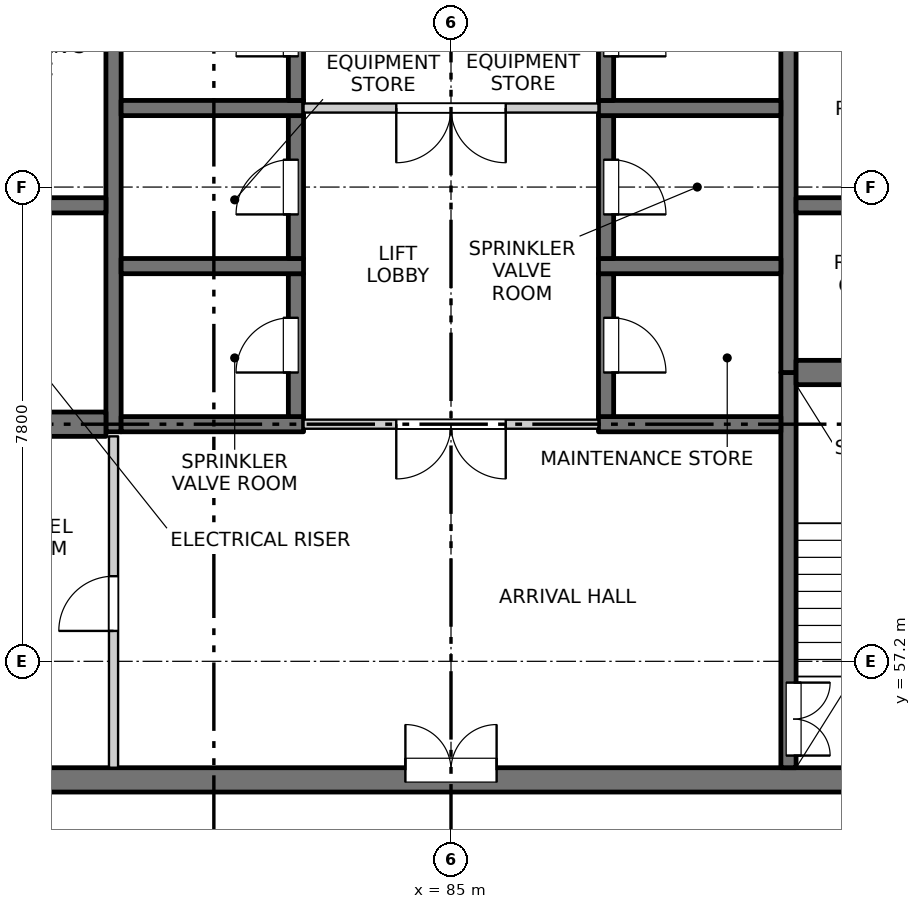
"""IFC4 building model, lengths in metres.
Left out: names, types, materials, properties, quantities, classifications, styles, units other than length and angle.
Written with IfcOpenShell. Run it as: python <this file> out.ifc"""

import sys

from ifc_helpers import new_model, si_unit, direction, frame, frame_2d, origin, place, context, subcontext, project, spatial, rectangle, extrude, element, fill, save


model = new_model("IFC4")
c1 = context("Model", 3, precision=1e-05, world=origin(), true_north=direction((0.0, 1.0)))
c2 = subcontext(c1, "Body", "Model", "MODEL_VIEW")
j1 = project(units=[si_unit("LENGTHUNIT", "METRE"), si_unit("PLANEANGLEUNIT", "RADIAN")], contexts=[c1])
p1 = place(None, origin())
s1 = spatial("IfcSite", under=j1, at=p1, CompositionType="ELEMENT")
p2 = place(p1, origin())
s2 = spatial("IfcBuilding", under=s1, at=p2, CompositionType="ELEMENT")
p3 = place(p2, frame((0.0, 0.0, 200.7)))
s3 = spatial("IfcBuildingStorey", under=s2, at=p3, CompositionType="ELEMENT", Elevation=200.7)
p4 = place(p3, frame((75.45, 55.25, -0.25), z_axis=(0.0, 0.0, 1.0), x_axis=(1.0, 0.0, 0.0)))
e1 = element("IfcWall", 1, at=p4, inside=s3, PredefinedType="SOLIDWALL", context=c2, shape_type="SweptSolid", body=[
    extrude(rectangle(XDim=19.1, YDim=0.4, at=frame_2d((9.55, 0.0))), origin(), (0.0, 0.0, 1.0), 3.4),
])
p5 = place(p4, frame((8.8, 0.0, 0.25)))
e2 = element("IfcOpeningElement", 2, at=p5, cuts=e1, PredefinedType="OPENING", context=c2, shape_type="SweptSolid", body=[
    extrude(rectangle(XDim=1.5, YDim=2.1, at=frame_2d((0.75, 1.05))), frame((0.0, 0.21, 0.0), z_axis=(0.0, -1.0, 0.0), x_axis=(1.0, 0.0, 0.0)), (0.0, 0.0, 1.0), 0.42),
])
p6 = place(p3, frame((79.45, 60.975, -0.25), z_axis=(0.0, 0.0, 1.0), x_axis=(0.0, 1.0, 0.0)))
e3 = element("IfcWall", 3, at=p6, inside=s3, PredefinedType="SOLIDWALL", context=c2, shape_type="SweptSolid", body=[
    extrude(rectangle(XDim=16.325, YDim=0.25, at=frame_2d((8.163, 0.0))), origin(), (0.0, 0.0, 1.0), 3.4),
])
p7 = place(p3, frame((90.55, 55.45, -0.25), z_axis=(0.0, 0.0, 1.0), x_axis=(0.0, 1.0, 0.0)))
e4 = element("IfcWall", 4, at=p7, inside=s3, PredefinedType="SOLIDWALL", context=c2, shape_type="SweptSolid", body=[
    extrude(rectangle(XDim=6.5, YDim=0.25, at=frame_2d((3.25, 0.0))), origin(), (0.0, 0.0, 1.0), 3.4),
])
p8 = place(p7, frame((0.2, 0.0, 0.25)))
e5 = element("IfcOpeningElement", 5, at=p8, cuts=e4, PredefinedType="OPENING", context=c2, shape_type="SweptSolid", body=[
    extrude(rectangle(XDim=1.2, YDim=2.1, at=frame_2d((0.6, 1.05))), frame((0.0, 0.135, 0.0), z_axis=(0.0, -1.0, 0.0), x_axis=(1.0, 0.0, 0.0)), (0.0, 0.0, 1.0), 0.27),
])
p9 = place(p3, frame((90.55, 61.95, -0.25), z_axis=(0.0, 0.0, 1.0), x_axis=(0.0, 1.0, 0.0)))
e6 = element("IfcWall", 6, at=p9, inside=s3, PredefinedType="SOLIDWALL", context=c2, shape_type="SweptSolid", body=[
    extrude(rectangle(XDim=15.35, YDim=0.25, at=frame_2d((7.675, 0.0))), origin(), (0.0, 0.0, 1.0), 3.4),
])
p10 = place(p3, frame((79.575, 61.1, -0.25), z_axis=(0.0, 0.0, 1.0), x_axis=(1.0, 0.0, 0.0)))
e7 = element("IfcWall", 7, at=p10, inside=s3, PredefinedType="SOLIDWALL", context=c2, shape_type="SweptSolid", body=[
    extrude(rectangle(XDim=3.0, YDim=0.25, at=frame_2d((1.5, 0.0))), origin(), (0.0, 0.0, 1.0), 3.4),
])
p11 = place(p3, frame((82.45, 61.225, -0.25), z_axis=(0.0, 0.0, 1.0), x_axis=(0.0, 1.0, 0.0)))
e8 = element("IfcWall", 8, at=p11, inside=s3, PredefinedType="SOLIDWALL", context=c2, shape_type="SweptSolid", body=[
    extrude(rectangle(XDim=2.35, YDim=0.25, at=frame_2d((1.175, 0.0))), origin(), (0.0, 0.0, 1.0), 3.4),
])
p12 = place(p11, frame((0.725, 0.0, 0.25)))
e9 = element("IfcOpeningElement", 9, at=p12, cuts=e8, PredefinedType="OPENING", context=c2, shape_type="SweptSolid", body=[
    extrude(rectangle(XDim=0.9, YDim=2.1, at=frame_2d((0.45, 1.05))), frame((0.0, 0.135, 0.0), z_axis=(0.0, -1.0, 0.0), x_axis=(1.0, 0.0, 0.0)), (0.0, 0.0, 1.0), 0.27),
])
p13 = place(p3, frame((79.575, 63.7, -0.25), z_axis=(0.0, 0.0, 1.0), x_axis=(1.0, 0.0, 0.0)))
e10 = element("IfcWall", 10, at=p13, inside=s3, PredefinedType="SOLIDWALL", context=c2, shape_type="SweptSolid", body=[
    extrude(rectangle(XDim=3.0, YDim=0.25, at=frame_2d((1.5, 0.0))), origin(), (0.0, 0.0, 1.0), 3.4),
])
p14 = place(p3, frame((82.45, 63.825, -0.25), z_axis=(0.0, 0.0, 1.0), x_axis=(0.0, 1.0, 0.0)))
e11 = element("IfcWall", 11, at=p14, inside=s3, PredefinedType="SOLIDWALL", context=c2, shape_type="SweptSolid", body=[
    extrude(rectangle(XDim=2.35, YDim=0.25, at=frame_2d((1.175, 0.0))), origin(), (0.0, 0.0, 1.0), 3.4),
])
p15 = place(p14, frame((0.725, 0.0, 0.25)))
e12 = element("IfcOpeningElement", 12, at=p15, cuts=e11, PredefinedType="OPENING", context=c2, shape_type="SweptSolid", body=[
    extrude(rectangle(XDim=0.9, YDim=2.1, at=frame_2d((0.45, 1.05))), frame((0.0, 0.135, 0.0), z_axis=(0.0, -1.0, 0.0), x_axis=(1.0, 0.0, 0.0)), (0.0, 0.0, 1.0), 0.27),
])
p16 = place(p3, frame((79.575, 66.3, -0.25), z_axis=(0.0, 0.0, 1.0), x_axis=(1.0, 0.0, 0.0)))
e13 = element("IfcWall", 13, at=p16, inside=s3, PredefinedType="SOLIDWALL", context=c2, shape_type="SweptSolid", body=[
    extrude(rectangle(XDim=3.0, YDim=0.25, at=frame_2d((1.5, 0.0))), origin(), (0.0, 0.0, 1.0), 3.4),
])
p17 = place(p3, frame((82.45, 66.425, -0.25), z_axis=(0.0, 0.0, 1.0), x_axis=(0.0, 1.0, 0.0)))
e14 = element("IfcWall", 14, at=p17, inside=s3, PredefinedType="SOLIDWALL", context=c2, shape_type="SweptSolid", body=[
    extrude(rectangle(XDim=2.35, YDim=0.25, at=frame_2d((1.175, 0.0))), origin(), (0.0, 0.0, 1.0), 3.4),
])
p18 = place(p17, frame((0.725, 0.0, 0.25)))
e15 = element("IfcOpeningElement", 15, at=p18, cuts=e14, PredefinedType="OPENING", context=c2, shape_type="SweptSolid", body=[
    extrude(rectangle(XDim=0.9, YDim=2.1, at=frame_2d((0.45, 1.05))), frame((0.0, 0.135, 0.0), z_axis=(0.0, -1.0, 0.0), x_axis=(1.0, 0.0, 0.0)), (0.0, 0.0, 1.0), 0.27),
])
p19 = place(p3, frame((87.425, 61.1, -0.25), z_axis=(0.0, 0.0, 1.0), x_axis=(1.0, 0.0, 0.0)))
e16 = element("IfcWall", 16, at=p19, inside=s3, PredefinedType="SOLIDWALL", context=c2, shape_type="SweptSolid", body=[
    extrude(rectangle(XDim=3.0, YDim=0.25, at=frame_2d((1.5, 0.0))), origin(), (0.0, 0.0, 1.0), 3.4),
])
p20 = place(p3, frame((87.55, 61.225, -0.25), z_axis=(0.0, 0.0, 1.0), x_axis=(0.0, 1.0, 0.0)))
e17 = element("IfcWall", 17, at=p20, inside=s3, PredefinedType="SOLIDWALL", context=c2, shape_type="SweptSolid", body=[
    extrude(rectangle(XDim=2.35, YDim=0.25, at=frame_2d((1.175, 0.0))), origin(), (0.0, 0.0, 1.0), 3.4),
])
p21 = place(p20, frame((0.725, 0.0, 0.25)))
e18 = element("IfcOpeningElement", 18, at=p21, cuts=e17, PredefinedType="OPENING", context=c2, shape_type="SweptSolid", body=[
    extrude(rectangle(XDim=0.9, YDim=2.1, at=frame_2d((0.45, 1.05))), frame((0.0, 0.135, 0.0), z_axis=(0.0, -1.0, 0.0), x_axis=(1.0, 0.0, 0.0)), (0.0, 0.0, 1.0), 0.27),
])
p22 = place(p3, frame((87.425, 63.7, -0.25), z_axis=(0.0, 0.0, 1.0), x_axis=(1.0, 0.0, 0.0)))
e19 = element("IfcWall", 19, at=p22, inside=s3, PredefinedType="SOLIDWALL", context=c2, shape_type="SweptSolid", body=[
    extrude(rectangle(XDim=3.0, YDim=0.25, at=frame_2d((1.5, 0.0))), origin(), (0.0, 0.0, 1.0), 3.4),
])
p23 = place(p3, frame((87.55, 63.825, -0.25), z_axis=(0.0, 0.0, 1.0), x_axis=(0.0, 1.0, 0.0)))
e20 = element("IfcWall", 20, at=p23, inside=s3, PredefinedType="SOLIDWALL", context=c2, shape_type="SweptSolid", body=[
    extrude(rectangle(XDim=2.35, YDim=0.25, at=frame_2d((1.175, 0.0))), origin(), (0.0, 0.0, 1.0), 3.4),
])
p24 = place(p23, frame((0.725, 0.0, 0.25)))
e21 = element("IfcOpeningElement", 21, at=p24, cuts=e20, PredefinedType="OPENING", context=c2, shape_type="SweptSolid", body=[
    extrude(rectangle(XDim=0.9, YDim=2.1, at=frame_2d((0.45, 1.05))), frame((0.0, 0.135, 0.0), z_axis=(0.0, -1.0, 0.0), x_axis=(1.0, 0.0, 0.0)), (0.0, 0.0, 1.0), 0.27),
])
p25 = place(p3, frame((87.425, 66.3, -0.25), z_axis=(0.0, 0.0, 1.0), x_axis=(1.0, 0.0, 0.0)))
e22 = element("IfcWall", 22, at=p25, inside=s3, PredefinedType="SOLIDWALL", context=c2, shape_type="SweptSolid", body=[
    extrude(rectangle(XDim=3.0, YDim=0.25, at=frame_2d((1.5, 0.0))), origin(), (0.0, 0.0, 1.0), 3.4),
])
p26 = place(p3, frame((87.55, 66.425, -0.25), z_axis=(0.0, 0.0, 1.0), x_axis=(0.0, 1.0, 0.0)))
e23 = element("IfcWall", 23, at=p26, inside=s3, PredefinedType="SOLIDWALL", context=c2, shape_type="SweptSolid", body=[
    extrude(rectangle(XDim=2.35, YDim=0.25, at=frame_2d((1.175, 0.0))), origin(), (0.0, 0.0, 1.0), 3.4),
])
p27 = place(p26, frame((0.725, 0.0, 0.25)))
e24 = element("IfcOpeningElement", 24, at=p27, cuts=e23, PredefinedType="OPENING", context=c2, shape_type="SweptSolid", body=[
    extrude(rectangle(XDim=0.9, YDim=2.1, at=frame_2d((0.45, 1.05))), frame((0.0, 0.135, 0.0), z_axis=(0.0, -1.0, 0.0), x_axis=(1.0, 0.0, 0.0)), (0.0, 0.0, 1.0), 0.27),
])
p28 = place(p3, frame((75.45, 61.1, -0.25), z_axis=(0.0, 0.0, 1.0), x_axis=(1.0, 0.0, 0.0)))
e25 = element("IfcWall", 25, at=p28, inside=s3, PredefinedType="SOLIDWALL", context=c2, shape_type="SweptSolid", body=[
    extrude(rectangle(XDim=3.875, YDim=0.4, at=frame_2d((1.938, 0.0))), origin(), (0.0, 0.0, 1.0), 3.4),
])
p29 = place(p3, frame((75.45, 64.7, -0.25), z_axis=(0.0, 0.0, 1.0), x_axis=(1.0, 0.0, 0.0)))
e26 = element("IfcWall", 26, at=p29, inside=s3, PredefinedType="SOLIDWALL", context=c2, shape_type="SweptSolid", body=[
    extrude(rectangle(XDim=3.875, YDim=0.25, at=frame_2d((1.938, 0.0))), origin(), (0.0, 0.0, 1.0), 3.4),
])
p30 = place(p3, frame((90.675, 61.95, -0.25), z_axis=(0.0, 0.0, 1.0), x_axis=(1.0, 0.0, 0.0)))
e27 = element("IfcWall", 27, at=p30, inside=s3, PredefinedType="SOLIDWALL", context=c2, shape_type="SweptSolid", body=[
    extrude(rectangle(XDim=3.875, YDim=0.4, at=frame_2d((1.938, 0.0))), origin(), (0.0, 0.0, 1.0), 3.4),
])
p31 = place(p3, frame((90.675, 64.7, -0.25), z_axis=(0.0, 0.0, 1.0), x_axis=(1.0, 0.0, 0.0)))
e28 = element("IfcWall", 28, at=p31, inside=s3, PredefinedType="SOLIDWALL", context=c2, shape_type="SweptSolid", body=[
    extrude(rectangle(XDim=3.875, YDim=0.25, at=frame_2d((1.938, 0.0))), origin(), (0.0, 0.0, 1.0), 3.4),
])
p32 = place(p3, frame((82.575, 61.1, 0.0), z_axis=(0.0, 0.0, 1.0), x_axis=(1.0, 0.0, 0.0)))
e29 = element("IfcWall", 29, at=p32, inside=s3, PredefinedType="PARTITIONING", context=c2, shape_type="SweptSolid", body=[
    extrude(rectangle(XDim=4.85, YDim=0.15, at=frame_2d((2.425, 0.0))), origin(), (0.0, 0.0, 1.0), 3.15),
])
p33 = place(p32, frame((1.525, 0.0, 0.0)))
e30 = element("IfcOpeningElement", 30, at=p33, cuts=e29, PredefinedType="OPENING", context=c2, shape_type="SweptSolid", body=[
    extrude(rectangle(XDim=1.8, YDim=2.1, at=frame_2d((0.9, 1.05))), frame((0.0, 0.085, 0.0), z_axis=(0.0, -1.0, 0.0), x_axis=(1.0, 0.0, 0.0)), (0.0, 0.0, 1.0), 0.17),
])
p34 = place(p3, frame((82.575, 66.3, 0.0), z_axis=(0.0, 0.0, 1.0), x_axis=(1.0, 0.0, 0.0)))
e31 = element("IfcWall", 31, at=p34, inside=s3, PredefinedType="PARTITIONING", context=c2, shape_type="SweptSolid", body=[
    extrude(rectangle(XDim=4.85, YDim=0.15, at=frame_2d((2.425, 0.0))), origin(), (0.0, 0.0, 1.0), 3.15),
])
p35 = place(p34, frame((1.525, 0.0, 0.0)))
e32 = element("IfcOpeningElement", 32, at=p35, cuts=e31, PredefinedType="OPENING", context=c2, shape_type="SweptSolid", body=[
    extrude(rectangle(XDim=1.8, YDim=2.1, at=frame_2d((0.9, 1.05))), frame((0.0, 0.085, 0.0), z_axis=(0.0, -1.0, 0.0), x_axis=(1.0, 0.0, 0.0)), (0.0, 0.0, 1.0), 0.17),
])
p36 = place(p3, frame((79.45, 55.45, 0.0), z_axis=(0.0, 0.0, 1.0), x_axis=(0.0, 1.0, 0.0)))
e33 = element("IfcWall", 33, at=p36, inside=s3, PredefinedType="PARTITIONING", context=c2, shape_type="SweptSolid", body=[
    extrude(rectangle(XDim=5.45, YDim=0.15, at=frame_2d((2.725, 0.0))), origin(), (0.0, 0.0, 1.0), 3.15),
])
p37 = place(p36, frame((2.25, 0.0, 0.0)))
e34 = element("IfcOpeningElement", 34, at=p37, cuts=e33, PredefinedType="OPENING", context=c2, shape_type="SweptSolid", body=[
    extrude(rectangle(XDim=0.9, YDim=2.1, at=frame_2d((0.45, 1.05))), frame((0.0, 0.085, 0.0), z_axis=(0.0, -1.0, 0.0), x_axis=(1.0, 0.0, 0.0)), (0.0, 0.0, 1.0), 0.17),
])
p38 = place(p5, origin())
e35 = element("IfcDoor", 35, at=p38, inside=s3, OperationType="DOUBLE_DOOR_SINGLE_SWING", PredefinedType="DOOR", context=c2, shape_type="SweptSolid", body=[
    extrude(rectangle(XDim=1.5, YDim=2.1, at=frame_2d((0.75, 1.05))), frame((0.0, 0.185, 0.0), z_axis=(0.0, -1.0, 0.0), x_axis=(1.0, 0.0, 0.0)), (0.0, 0.0, 1.0), 0.05),
])
fill(e2, e35)
p39 = place(p8, origin())
e36 = element("IfcDoor", 36, at=p39, inside=s3, OperationType="DOUBLE_DOOR_SINGLE_SWING", PredefinedType="DOOR", context=c2, shape_type="SweptSolid", body=[
    extrude(rectangle(XDim=1.2, YDim=2.1, at=frame_2d((0.6, 1.05))), frame((0.0, -0.06, 0.0), z_axis=(0.0, -1.0, 0.0), x_axis=(1.0, 0.0, 0.0)), (0.0, 0.0, 1.0), 0.05),
])
fill(e5, e36)
p40 = place(p37, origin())
e37 = element("IfcDoor", 37, at=p40, inside=s3, OperationType="SINGLE_SWING_LEFT", PredefinedType="DOOR", context=c2, shape_type="SweptSolid", body=[
    extrude(rectangle(XDim=0.9, YDim=2.1, at=frame_2d((0.45, 1.05))), frame((0.0, 0.025, 0.0), z_axis=(0.0, -1.0, 0.0), x_axis=(1.0, 0.0, 0.0)), (0.0, 0.0, 1.0), 0.05),
])
fill(e34, e37)
p41 = place(p33, origin())
e38 = element("IfcDoor", 38, at=p41, inside=s3, OperationType="DOUBLE_DOOR_SINGLE_SWING", PredefinedType="DOOR", context=c2, shape_type="SweptSolid", body=[
    extrude(rectangle(XDim=1.8, YDim=2.1, at=frame_2d((0.9, 1.05))), frame((0.0, 0.025, 0.0), z_axis=(0.0, -1.0, 0.0), x_axis=(1.0, 0.0, 0.0)), (0.0, 0.0, 1.0), 0.05),
])
fill(e30, e38)
p42 = place(p12, origin())
e39 = element("IfcDoor", 39, at=p42, inside=s3, OperationType="SINGLE_SWING_LEFT", PredefinedType="DOOR", context=c2, shape_type="SweptSolid", body=[
    extrude(rectangle(XDim=0.9, YDim=2.1, at=frame_2d((0.45, 1.05))), frame((0.0, 0.11, 0.0), z_axis=(0.0, -1.0, 0.0), x_axis=(1.0, 0.0, 0.0)), (0.0, 0.0, 1.0), 0.05),
])
fill(e9, e39)
p43 = place(p21, origin())
e40 = element("IfcDoor", 40, at=p43, inside=s3, OperationType="SINGLE_SWING_RIGHT", PredefinedType="DOOR", context=c2, shape_type="SweptSolid", body=[
    extrude(rectangle(XDim=0.9, YDim=2.1, at=frame_2d((0.45, 1.05))), frame((0.0, -0.06, 0.0), z_axis=(0.0, -1.0, 0.0), x_axis=(1.0, 0.0, 0.0)), (0.0, 0.0, 1.0), 0.05),
])
fill(e18, e40)
p44 = place(p15, origin())
e41 = element("IfcDoor", 41, at=p44, inside=s3, OperationType="SINGLE_SWING_LEFT", PredefinedType="DOOR", context=c2, shape_type="SweptSolid", body=[
    extrude(rectangle(XDim=0.9, YDim=2.1, at=frame_2d((0.45, 1.05))), frame((0.0, 0.11, 0.0), z_axis=(0.0, -1.0, 0.0), x_axis=(1.0, 0.0, 0.0)), (0.0, 0.0, 1.0), 0.05),
])
fill(e12, e41)
p45 = place(p24, origin())
e42 = element("IfcDoor", 42, at=p45, inside=s3, OperationType="SINGLE_SWING_RIGHT", PredefinedType="DOOR", context=c2, shape_type="SweptSolid", body=[
    extrude(rectangle(XDim=0.9, YDim=2.1, at=frame_2d((0.45, 1.05))), frame((0.0, -0.06, 0.0), z_axis=(0.0, -1.0, 0.0), x_axis=(1.0, 0.0, 0.0)), (0.0, 0.0, 1.0), 0.05),
])
fill(e21, e42)
p46 = place(p35, origin())
e43 = element("IfcDoor", 43, at=p46, inside=s3, OperationType="DOUBLE_DOOR_SINGLE_SWING", PredefinedType="DOOR", context=c2, shape_type="SweptSolid", body=[
    extrude(rectangle(XDim=1.8, YDim=2.1, at=frame_2d((0.9, 1.05))), frame((0.0, 0.025, 0.0), z_axis=(0.0, -1.0, 0.0), x_axis=(1.0, 0.0, 0.0)), (0.0, 0.0, 1.0), 0.05),
])
fill(e32, e43)
p47 = place(p18, origin())
e44 = element("IfcDoor", 44, at=p47, inside=s3, OperationType="SINGLE_SWING_LEFT", PredefinedType="DOOR", context=c2, shape_type="SweptSolid", body=[
    extrude(rectangle(XDim=0.9, YDim=2.1, at=frame_2d((0.45, 1.05))), frame((0.0, 0.11, 0.0), z_axis=(0.0, -1.0, 0.0), x_axis=(1.0, 0.0, 0.0)), (0.0, 0.0, 1.0), 0.05),
])
fill(e15, e44)
p48 = place(p27, origin())
e45 = element("IfcDoor", 45, at=p48, inside=s3, OperationType="SINGLE_SWING_RIGHT", PredefinedType="DOOR", context=c2, shape_type="SweptSolid", body=[
    extrude(rectangle(XDim=0.9, YDim=2.1, at=frame_2d((0.45, 1.05))), frame((0.0, -0.06, 0.0), z_axis=(0.0, -1.0, 0.0), x_axis=(1.0, 0.0, 0.0)), (0.0, 0.0, 1.0), 0.05),
])
fill(e24, e45)
save(model, sys.argv[1])
